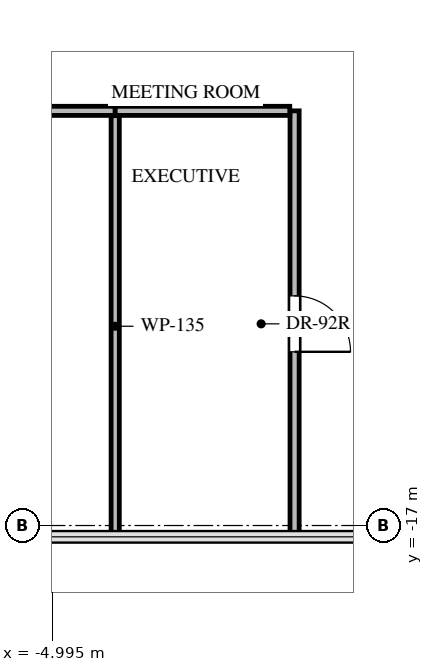
"""IFC4 building model, lengths in metres.
Left out: names, types, materials, properties, quantities, classifications, styles, units other than length and angle.
Written with IfcOpenShell. Run it as: python <this file> out.ifc"""

import sys

from ifc_helpers import new_model, si_unit, direction, frame, frame_2d, origin, place, context, subcontext, project, spatial, rectangle, extrude, source, transform, mapped, element, fill, save


model = new_model("IFC4")
c1 = context("Model", 3, precision=1e-05, world=origin(), true_north=direction((0.0, 1.0)))
c2 = subcontext(c1, "Body", "Model", "MODEL_VIEW")
j1 = project(units=[si_unit("LENGTHUNIT", "METRE"), si_unit("PLANEANGLEUNIT", "RADIAN")], contexts=[c1])
p1 = place(None, origin())
s1 = spatial("IfcSite", under=j1, at=p1, CompositionType="ELEMENT")
p2 = place(p1, origin())
s2 = spatial("IfcBuilding", under=s1, at=p2, CompositionType="ELEMENT")
p3 = place(p2, frame((0.0, 0.0, 231.5)))
s3 = spatial("IfcBuildingStorey", under=s2, at=p3, CompositionType="ELEMENT", Elevation=231.5)
p4 = place(p3, frame((-9.96, -10.18, 0.0), z_axis=(0.0, 0.0, 1.0), x_axis=(1.0, 0.0, 0.0)))
e1 = element("IfcWall", 1, at=p4, inside=s3, PredefinedType="PARTITIONING", context=c2, shape_type="SweptSolid", body=[
    extrude(rectangle(XDim=6.0, YDim=0.15, at=frame_2d((3.0, 0.0))), origin(), (0.0, 0.0, 1.0), 2.301),
])
p5 = place(p4, frame((2.525, 0.0, 0.0)))
e2 = element("IfcOpeningElement", 2, at=p5, cuts=e1, PredefinedType="OPENING", context=c2, shape_type="SweptSolid", body=[
    extrude(rectangle(XDim=0.95, YDim=2.1, at=frame_2d((0.475, 1.05))), frame((0.0, 0.085, 0.0), z_axis=(0.0, -1.0, 0.0), x_axis=(1.0, 0.0, 0.0)), (0.0, 0.0, 1.0), 0.17),
])
p6 = place(p3, frame((-1.01, -10.18, 0.0), z_axis=(0.0, 0.0, 1.0), x_axis=(0.0, -1.0, 0.0)))
e3 = element("IfcWall", 3, at=p6, inside=s3, PredefinedType="PARTITIONING", context=c2, shape_type="SweptSolid", body=[
    extrude(rectangle(XDim=7.006, YDim=0.15, at=frame_2d((3.503, 0.0))), origin(), (0.0, 0.0, 1.0), 2.399),
])
p7 = place(p6, frame((3.043, 0.0, 0.0)))
e4 = element("IfcOpeningElement", 4, at=p7, cuts=e3, PredefinedType="OPENING", context=c2, shape_type="SweptSolid", body=[
    extrude(rectangle(XDim=0.92, YDim=2.1, at=frame_2d((0.46, 1.05))), frame((0.0, 0.085, 0.0), z_axis=(0.0, -1.0, 0.0), x_axis=(1.0, 0.0, 0.0)), (0.0, 0.0, 1.0), 0.17),
])
p8 = place(p3, frame((-3.96, -10.18, 0.0), z_axis=(0.0, 0.0, 1.0), x_axis=(1.0, 0.0, 0.0)))
e5 = element("IfcWall", 5, at=p8, inside=s3, PredefinedType="PARTITIONING", context=c2, shape_type="SweptSolid", body=[
    extrude(rectangle(XDim=2.871, YDim=0.15, at=frame_2d((1.436, 0.0))), origin(), (0.0, 0.0, 1.0), 3.045),
])
p9 = place(p3, frame((-3.96, -10.259, 0.0), z_axis=(0.0, 0.0, 1.0), x_axis=(0.0, -1.0, 0.0)))
e6 = element("IfcWall", 6, at=p9, inside=s3, PredefinedType="PARTITIONING", context=c2, shape_type="SweptSolid", body=[
    extrude(rectangle(XDim=6.927, YDim=0.135, at=frame_2d((3.463, 0.0))), origin(), (0.0, 0.0, 1.0), 2.399),
])
m1 = source(origin(), c2, "Body", "SweptSolid", [
    extrude(rectangle(XDim=0.92, YDim=2.1, at=frame_2d((0.46, 1.05))), frame((0.0, 0.025, 0.0), z_axis=(0.0, -1.0, 0.0), x_axis=(1.0, 0.0, 0.0)), (0.0, 0.0, 1.0), 0.05),
])
p10 = place(p7, origin())
e7 = element("IfcDoor", 7, at=p10, inside=s3, OperationType="SINGLE_SWING_RIGHT", PredefinedType="DOOR", context=c2, shape_type="MappedRepresentation", body=[
    mapped(m1, transform((0.0, 0.0, 0.0), x_axis=(1.0, 0.0, 0.0), y_axis=(0.0, 1.0, 0.0), z_axis=(0.0, 0.0, 1.0), scale=1.0)),
])
fill(e4, e7)
save(model, sys.argv[1])
